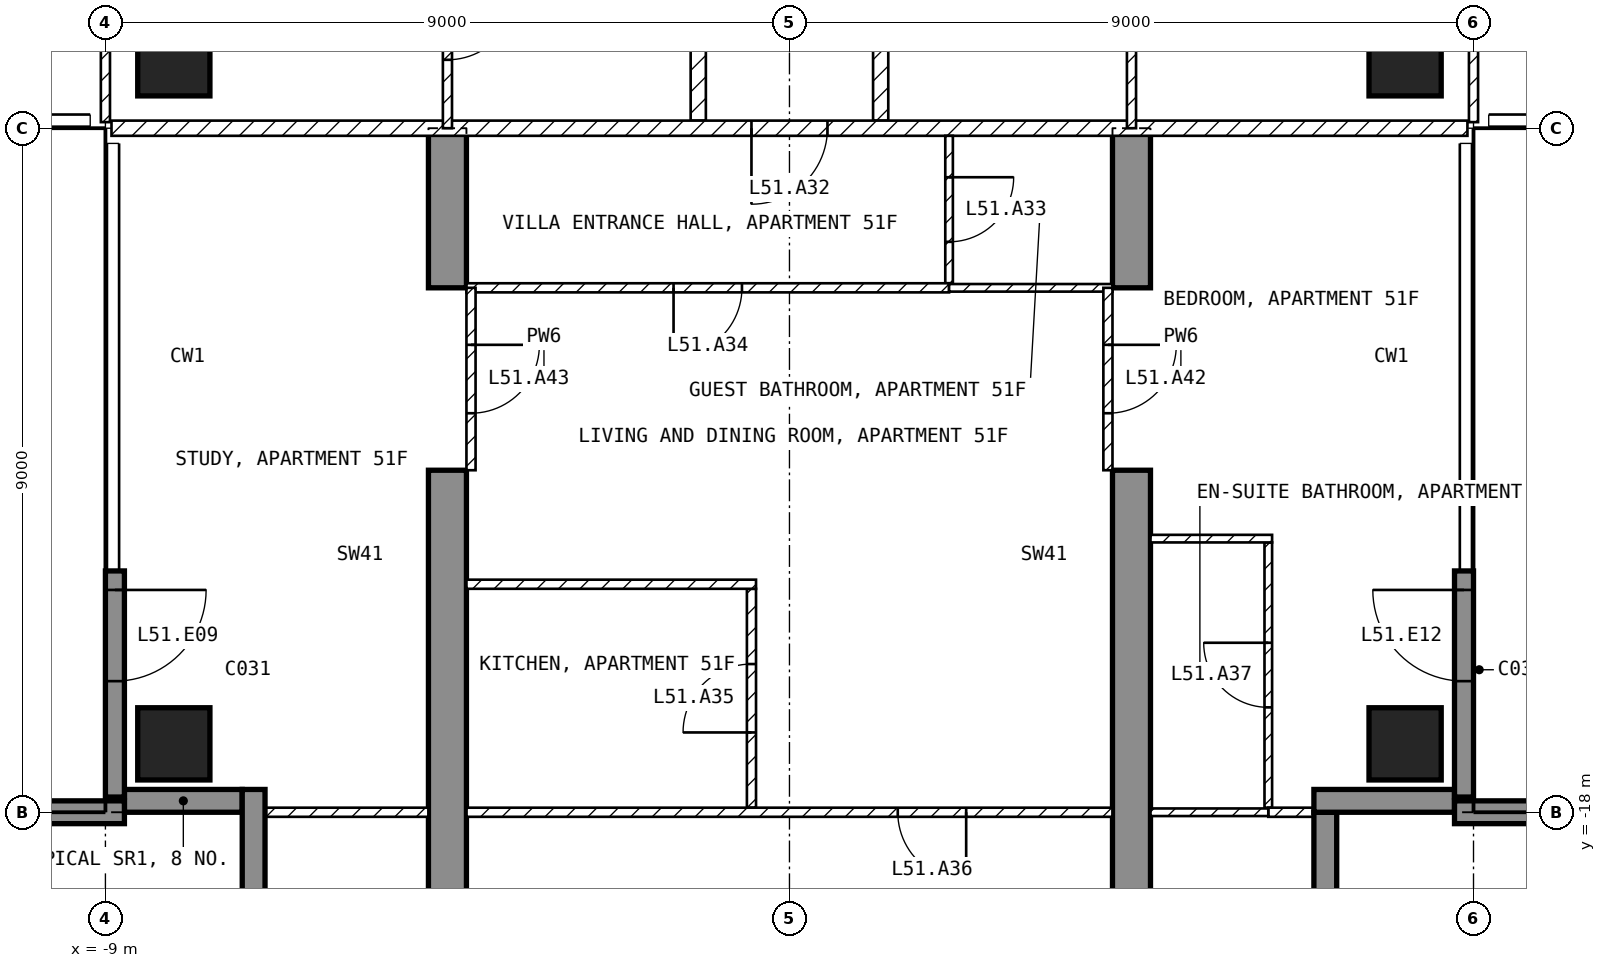
"""IFC4 building model, lengths in metres.
Left out: names, types, materials, properties, quantities, classifications, styles, units other than length and angle.
Written with IfcOpenShell. Run it as: python <this file> out.ifc"""

import sys

from ifc_helpers import new_model, si_unit, direction, frame, frame_2d, origin, origin_2d, place, context, subcontext, project, spatial, polyline, rectangle, outline, extrude, element, fill, save


model = new_model("IFC4")
c1 = context("Model", 3, precision=1e-05, world=origin(), true_north=direction((0.0, 1.0)))
c2 = subcontext(c1, "Body", "Model", "MODEL_VIEW")
j1 = project(units=[si_unit("LENGTHUNIT", "METRE"), si_unit("PLANEANGLEUNIT", "RADIAN")], contexts=[c1])
p1 = place(None, origin())
s1 = spatial("IfcSite", under=j1, at=p1, CompositionType="ELEMENT")
p2 = place(p1, origin())
s2 = spatial("IfcBuilding", under=s1, at=p2, CompositionType="ELEMENT")
p3 = place(p2, frame((0.0, 0.0, 205.1)))
s3 = spatial("IfcBuildingStorey", under=s2, at=p3, CompositionType="ELEMENT", Elevation=205.1)
for number, where, z_axis, x_axis in (
    (1, (-8.1, -17.1, -0.25), (0.0, 0.0, 1.0), (1.0, 0.0, 0.0)),
    (2, (-8.1, -8.1, -0.25), (0.0, 0.0, 1.0), (1.0, 0.0, 0.0)),
    (3, (8.1, -17.1, -0.25), (0.0, 0.0, 1.0), (1.0, 0.0, 0.0)),
    (4, (8.1, -8.1, -0.25), (0.0, 0.0, 1.0), (1.0, 0.0, 0.0)),
):
    element("IfcColumn", number, at=place(p3, frame(where, z_axis=z_axis, x_axis=x_axis)), inside=s3, PredefinedType="COLUMN", context=c2, shape_type="SweptSolid", body=[
        extrude(rectangle(XDim=0.95, YDim=0.95, at=origin_2d()), origin(), (0.0, 0.0, 1.0), 3.5),
    ])
for number, where, z_axis, x_axis in (
    (5, (-4.75, -20.225, -0.25), (1.0, 0.0, 0.0), (0.0, 1.0, 0.0)),
    (6, (4.25, -20.225, -0.25), (1.0, 0.0, 0.0), (0.0, 1.0, 0.0)),
):
    element("IfcWall", number, at=place(p3, frame(where, z_axis=z_axis, x_axis=x_axis)), inside=s3, PredefinedType="SHEAR", context=c2, shape_type="SweptSolid", body=[
        extrude(outline(polyline([(0.0, 0.0), (6.725, 0.0), (6.725, 2.65), (9.125, 2.65), (9.125, 0.0), (11.225, 0.0), (11.225, 3.5), (0.0, 3.5), (0.0, 0.0)])), origin(), (0.0, 0.0, 1.0), 0.5),
    ])
p4 = place(p3, frame((-8.875, -14.825, 0.0), z_axis=(0.0, 0.0, 1.0), x_axis=(0.0, -1.0, 0.0)))
e7 = element("IfcWall", 7, at=p4, inside=s3, PredefinedType="SOLIDWALL", context=c2, shape_type="SweptSolid", body=[
    extrude(rectangle(XDim=2.975, YDim=0.25, at=frame_2d((1.488, 0.0))), origin(), (0.0, 0.0, 1.0), 3.25),
])
p5 = place(p4, frame((0.25, 0.0, 0.0)))
e8 = element("IfcOpeningElement", 8, at=p5, cuts=e7, PredefinedType="OPENING", context=c2, shape_type="SweptSolid", body=[
    extrude(rectangle(XDim=1.2, YDim=2.4, at=frame_2d((0.6, 1.2))), frame((0.0, 0.135, 0.0), z_axis=(0.0, -1.0, 0.0), x_axis=(1.0, 0.0, 0.0)), (0.0, 0.0, 1.0), 0.27),
])
p6 = place(p3, frame((8.875, -17.8, 0.0), z_axis=(0.0, 0.0, 1.0), x_axis=(0.0, 1.0, 0.0)))
e9 = element("IfcWall", 9, at=p6, inside=s3, PredefinedType="SOLIDWALL", context=c2, shape_type="SweptSolid", body=[
    extrude(rectangle(XDim=2.975, YDim=0.25, at=frame_2d((1.488, 0.0))), origin(), (0.0, 0.0, 1.0), 3.25),
])
p7 = place(p6, frame((1.525, 0.0, 0.0)))
e10 = element("IfcOpeningElement", 10, at=p7, cuts=e9, PredefinedType="OPENING", context=c2, shape_type="SweptSolid", body=[
    extrude(rectangle(XDim=1.2, YDim=2.4, at=frame_2d((0.6, 1.2))), frame((0.0, 0.135, 0.0), z_axis=(0.0, -1.0, 0.0), x_axis=(1.0, 0.0, 0.0)), (0.0, 0.0, 1.0), 0.27),
])
p8 = place(p3, frame((7.05, -19.8, 0.0), z_axis=(0.0, 0.0, 1.0), x_axis=(0.0, 1.0, 0.0)))
e11 = element("IfcWall", 11, at=p8, inside=s3, PredefinedType="SOLIDWALL", context=c2, shape_type="SweptSolid", body=[
    extrude(rectangle(XDim=1.8, YDim=0.3, at=frame_2d((0.9, 0.0))), origin(), (0.0, 0.0, 1.0), 3.25),
])
p9 = place(p3, frame((6.9, -17.85, 0.0), z_axis=(0.0, 0.0, 1.0), x_axis=(1.0, 0.0, 0.0)))
e12 = element("IfcWall", 12, at=p9, inside=s3, PredefinedType="SOLIDWALL", context=c2, shape_type="SweptSolid", body=[
    extrude(rectangle(XDim=1.85, YDim=0.3, at=frame_2d((0.925, 0.0))), origin(), (0.0, 0.0, 1.0), 3.25),
])
p10 = place(p3, frame((-8.75, -17.85, 0.0), z_axis=(0.0, 0.0, 1.0), x_axis=(1.0, 0.0, 0.0)))
e13 = element("IfcWall", 13, at=p10, inside=s3, PredefinedType="SOLIDWALL", context=c2, shape_type="SweptSolid", body=[
    extrude(rectangle(XDim=1.55, YDim=0.3, at=frame_2d((0.775, 0.0))), origin(), (0.0, 0.0, 1.0), 3.25),
])
p11 = place(p3, frame((-7.05, -17.7, 0.0), z_axis=(0.0, 0.0, 1.0), x_axis=(0.0, -1.0, 0.0)))
e14 = element("IfcWall", 14, at=p11, inside=s3, PredefinedType="SOLIDWALL", context=c2, shape_type="SweptSolid", body=[
    extrude(rectangle(XDim=1.8, YDim=0.3, at=frame_2d((0.9, 0.0))), origin(), (0.0, 0.0, 1.0), 3.25),
])
for number, where, z_axis, x_axis in (
    (15, (-8.75, -18.0, 0.0), (0.0, 0.0, 1.0), (-1.0, 0.0, 0.0)),
    (16, (8.75, -18.0, 0.0), (0.0, 0.0, 1.0), (1.0, 0.0, 0.0)),
):
    element("IfcWall", number, at=place(p3, frame(where, z_axis=z_axis, x_axis=x_axis)), inside=s3, PredefinedType="SOLIDWALL", context=c2, shape_type="SweptSolid", body=[
        extrude(rectangle(XDim=2.95, YDim=0.3, at=frame_2d((1.475, 0.0))), origin(), (0.0, 0.0, 1.0), 3.25),
    ])
for number, where, z_axis, x_axis in (
    (17, (1.2, -4.6, 0.0), (0.0, 0.0, 1.0), (0.0, -1.0, 0.0)),
    (18, (-1.2, -8.9, 0.0), (0.0, 0.0, 1.0), (0.0, 1.0, 0.0)),
):
    element("IfcWall", number, at=place(p3, frame(where, z_axis=z_axis, x_axis=x_axis)), inside=s3, PredefinedType="PARTITIONING", context=c2, shape_type="SweptSolid", body=[
        extrude(rectangle(XDim=4.3, YDim=0.2, at=frame_2d((2.15, 0.0))), origin(), (0.0, 0.0, 1.0), 3.25),
    ])
p12 = place(p3, frame((8.92, -9.0, 0.0), z_axis=(0.0, 0.0, 1.0), x_axis=(-1.0, 0.0, 0.0)))
e19 = element("IfcWall", 19, at=p12, inside=s3, PredefinedType="PARTITIONING", context=c2, shape_type="SweptSolid", body=[
    extrude(rectangle(XDim=17.84, YDim=0.2, at=frame_2d((8.92, 0.0))), origin(), (0.0, 0.0, 1.0), 3.25),
])
p13 = place(p12, frame((8.42, 0.0, 0.0)))
e20 = element("IfcOpeningElement", 20, at=p13, cuts=e19, PredefinedType="OPENING", context=c2, shape_type="SweptSolid", body=[
    extrude(rectangle(XDim=1.0, YDim=2.1, at=frame_2d((0.5, 1.05))), frame((0.0, 0.11, 0.0), z_axis=(0.0, -1.0, 0.0), x_axis=(1.0, 0.0, 0.0)), (0.0, 0.0, 1.0), 0.22),
])
p14 = place(p3, frame((9.0, -8.92, 0.0), z_axis=(0.0, 0.0, 1.0), x_axis=(0.0, 1.0, 0.0)))
e21 = element("IfcWall", 21, at=p14, inside=s3, PredefinedType="PARTITIONING", context=c2, shape_type="SweptSolid", body=[
    extrude(rectangle(XDim=7.62, YDim=0.12, at=frame_2d((3.81, 0.0))), origin(), (0.0, 0.0, 1.0), 3.25),
])
p15 = place(p14, frame((2.42, 0.0, 0.0)))
e22 = element("IfcOpeningElement", 22, at=p15, cuts=e21, PredefinedType="OPENING", context=c2, shape_type="SweptSolid", body=[
    extrude(rectangle(XDim=0.9, YDim=2.1, at=frame_2d((0.45, 1.05))), frame((0.0, 0.07, 0.0), z_axis=(0.0, -1.0, 0.0), x_axis=(1.0, 0.0, 0.0)), (0.0, 0.0, 1.0), 0.14),
])
p16 = place(p3, frame((4.5, -9.0, 0.0), z_axis=(0.0, 0.0, 1.0), x_axis=(0.0, 1.0, 0.0)))
e23 = element("IfcWall", 23, at=p16, inside=s3, PredefinedType="PARTITIONING", context=c2, shape_type="SweptSolid", body=[
    extrude(rectangle(XDim=4.5, YDim=0.12, at=frame_2d((2.25, 0.0))), origin(), (0.0, 0.0, 1.0), 3.25),
])
p17 = place(p16, frame((1.8, 0.0, 0.0)))
e24 = element("IfcOpeningElement", 24, at=p17, cuts=e23, PredefinedType="OPENING", context=c2, shape_type="SweptSolid", body=[
    extrude(rectangle(XDim=0.9, YDim=2.1, at=frame_2d((0.45, 1.05))), frame((0.0, 0.07, 0.0), z_axis=(0.0, -1.0, 0.0), x_axis=(1.0, 0.0, 0.0)), (0.0, 0.0, 1.0), 0.14),
])
p18 = place(p3, frame((-9.0, -1.3, 0.0), z_axis=(0.0, 0.0, 1.0), x_axis=(0.0, -1.0, 0.0)))
e25 = element("IfcWall", 25, at=p18, inside=s3, PredefinedType="PARTITIONING", context=c2, shape_type="SweptSolid", body=[
    extrude(rectangle(XDim=7.62, YDim=0.12, at=frame_2d((3.81, 0.0))), origin(), (0.0, 0.0, 1.0), 3.25),
])
p19 = place(p18, frame((4.1, 0.0, 0.0)))
e26 = element("IfcOpeningElement", 26, at=p19, cuts=e25, PredefinedType="OPENING", context=c2, shape_type="SweptSolid", body=[
    extrude(rectangle(XDim=0.9, YDim=2.1, at=frame_2d((0.45, 1.05))), frame((0.0, 0.07, 0.0), z_axis=(0.0, -1.0, 0.0), x_axis=(1.0, 0.0, 0.0)), (0.0, 0.0, 1.0), 0.14),
])
p20 = place(p3, frame((-4.5, -6.3, 0.0), z_axis=(0.0, 0.0, 1.0), x_axis=(0.0, -1.0, 0.0)))
e27 = element("IfcWall", 27, at=p20, inside=s3, PredefinedType="PARTITIONING", context=c2, shape_type="SweptSolid", body=[
    extrude(rectangle(XDim=2.7, YDim=0.12, at=frame_2d((1.35, 0.0))), origin(), (0.0, 0.0, 1.0), 3.25),
])
p21 = place(p20, frame((0.9, 0.0, 0.0)))
e28 = element("IfcOpeningElement", 28, at=p21, cuts=e27, PredefinedType="OPENING", context=c2, shape_type="SweptSolid", body=[
    extrude(rectangle(XDim=0.9, YDim=2.1, at=frame_2d((0.45, 1.05))), frame((0.0, 0.07, 0.0), z_axis=(0.0, -1.0, 0.0), x_axis=(1.0, 0.0, 0.0)), (0.0, 0.0, 1.0), 0.14),
])
p22 = place(p3, frame((2.1, -9.1, 0.0), z_axis=(0.0, 0.0, 1.0), x_axis=(0.0, -1.0, 0.0)))
e29 = element("IfcWall", 29, at=p22, inside=s3, PredefinedType="PARTITIONING", context=c2, shape_type="SweptSolid", body=[
    extrude(rectangle(XDim=1.94, YDim=0.1, at=frame_2d((0.97, 0.0))), origin(), (0.0, 0.0, 1.0), 3.25),
])
p23 = place(p22, frame((0.545, 0.0, 0.0)))
e30 = element("IfcOpeningElement", 30, at=p23, cuts=e29, PredefinedType="OPENING", context=c2, shape_type="SweptSolid", body=[
    extrude(rectangle(XDim=0.85, YDim=2.1, at=frame_2d((0.425, 1.05))), frame((0.0, 0.06, 0.0), z_axis=(0.0, -1.0, 0.0), x_axis=(1.0, 0.0, 0.0)), (0.0, 0.0, 1.0), 0.12),
])
p24 = place(p3, frame((2.1, -11.1, 0.0), z_axis=(0.0, 0.0, 1.0), x_axis=(-1.0, 0.0, 0.0)))
e31 = element("IfcWall", 31, at=p24, inside=s3, PredefinedType="PARTITIONING", context=c2, shape_type="SweptSolid", body=[
    extrude(rectangle(XDim=6.35, YDim=0.12, at=frame_2d((3.175, 0.0))), origin(), (0.0, 0.0, 1.0), 3.25),
])
p25 = place(p24, frame((2.725, 0.0, 0.0)))
e32 = element("IfcOpeningElement", 32, at=p25, cuts=e31, PredefinedType="OPENING", context=c2, shape_type="SweptSolid", body=[
    extrude(rectangle(XDim=0.9, YDim=2.1, at=frame_2d((0.45, 1.05))), frame((0.0, 0.07, 0.0), z_axis=(0.0, -1.0, 0.0), x_axis=(1.0, 0.0, 0.0)), (0.0, 0.0, 1.0), 0.14),
])
p26 = place(p3, frame((4.25, -11.1, 0.0), z_axis=(0.0, 0.0, 1.0), x_axis=(-1.0, 0.0, 0.0)))
e33 = element("IfcWall", 33, at=p26, inside=s3, PredefinedType="PARTITIONING", context=c2, shape_type="SweptSolid", body=[
    extrude(rectangle(XDim=2.15, YDim=0.1, at=frame_2d((1.075, 0.0))), origin(), (0.0, 0.0, 1.0), 3.25),
])
p27 = place(p3, frame((-0.5, -17.94, 0.0), z_axis=(0.0, 0.0, 1.0), x_axis=(0.0, 1.0, 0.0)))
e34 = element("IfcWall", 34, at=p27, inside=s3, PredefinedType="PARTITIONING", context=c2, shape_type="SweptSolid", body=[
    extrude(rectangle(XDim=2.88, YDim=0.12, at=frame_2d((1.44, 0.0))), origin(), (0.0, 0.0, 1.0), 3.25),
])
p28 = place(p27, frame((0.99, 0.0, 0.0)))
e35 = element("IfcOpeningElement", 35, at=p28, cuts=e34, PredefinedType="OPENING", context=c2, shape_type="SweptSolid", body=[
    extrude(rectangle(XDim=0.9, YDim=2.1, at=frame_2d((0.45, 1.05))), frame((0.0, 0.07, 0.0), z_axis=(0.0, -1.0, 0.0), x_axis=(1.0, 0.0, 0.0)), (0.0, 0.0, 1.0), 0.14),
])
p29 = place(p3, frame((-0.44, -15.0, 0.0), z_axis=(0.0, 0.0, 1.0), x_axis=(-1.0, 0.0, 0.0)))
e36 = element("IfcWall", 36, at=p29, inside=s3, PredefinedType="PARTITIONING", context=c2, shape_type="SweptSolid", body=[
    extrude(rectangle(XDim=3.81, YDim=0.12, at=frame_2d((1.905, 0.0))), origin(), (0.0, 0.0, 1.0), 3.25),
])
p30 = place(p3, frame((4.25, -18.0, 0.0), z_axis=(0.0, 0.0, 1.0), x_axis=(-1.0, 0.0, 0.0)))
e37 = element("IfcWall", 37, at=p30, inside=s3, PredefinedType="PARTITIONING", context=c2, shape_type="SweptSolid", body=[
    extrude(rectangle(XDim=8.5, YDim=0.12, at=frame_2d((4.25, 0.0))), origin(), (0.0, 0.0, 1.0), 3.25),
])
p31 = place(p30, frame((1.925, 0.0, 0.0)))
e38 = element("IfcOpeningElement", 38, at=p31, cuts=e37, PredefinedType="OPENING", context=c2, shape_type="SweptSolid", body=[
    extrude(rectangle(XDim=0.9, YDim=2.1, at=frame_2d((0.45, 1.05))), frame((0.0, 0.07, 0.0), z_axis=(0.0, -1.0, 0.0), x_axis=(1.0, 0.0, 0.0)), (0.0, 0.0, 1.0), 0.14),
])
p32 = place(p3, frame((6.3, -17.94, 0.0), z_axis=(0.0, 0.0, 1.0), x_axis=(0.0, 1.0, 0.0)))
e39 = element("IfcWall", 39, at=p32, inside=s3, PredefinedType="PARTITIONING", context=c2, shape_type="SweptSolid", body=[
    extrude(rectangle(XDim=3.49, YDim=0.1, at=frame_2d((1.745, 0.0))), origin(), (0.0, 0.0, 1.0), 3.25),
])
p33 = place(p32, frame((1.32, 0.0, 0.0)))
e40 = element("IfcOpeningElement", 40, at=p33, cuts=e39, PredefinedType="OPENING", context=c2, shape_type="SweptSolid", body=[
    extrude(rectangle(XDim=0.85, YDim=2.1, at=frame_2d((0.425, 1.05))), frame((0.0, 0.06, 0.0), z_axis=(0.0, -1.0, 0.0), x_axis=(1.0, 0.0, 0.0)), (0.0, 0.0, 1.0), 0.12),
])
p34 = place(p3, frame((6.35, -14.4, 0.0), z_axis=(0.0, 0.0, 1.0), x_axis=(-1.0, 0.0, 0.0)))
e41 = element("IfcWall", 41, at=p34, inside=s3, PredefinedType="PARTITIONING", context=c2, shape_type="SweptSolid", body=[
    extrude(rectangle(XDim=1.6, YDim=0.1, at=frame_2d((0.8, 0.0))), origin(), (0.0, 0.0, 1.0), 3.25),
])
p35 = place(p3, frame((7.12, -18.0, 0.0), z_axis=(0.0, 0.0, 1.0), x_axis=(-1.0, 0.0, 0.0)))
e42 = element("IfcWall", 42, at=p35, inside=s3, PredefinedType="PARTITIONING", context=c2, shape_type="SweptSolid", body=[
    extrude(rectangle(XDim=0.82, YDim=0.12, at=frame_2d((0.41, 0.0))), origin(), (0.0, 0.0, 1.0), 3.25),
])
p36 = place(p3, frame((6.3, -18.0, 0.0), z_axis=(0.0, 0.0, 1.0), x_axis=(-1.0, 0.0, 0.0)))
e43 = element("IfcWall", 43, at=p36, inside=s3, PredefinedType="PARTITIONING", context=c2, shape_type="SweptSolid", body=[
    extrude(rectangle(XDim=1.55, YDim=0.1, at=frame_2d((0.775, 0.0))), origin(), (0.0, 0.0, 1.0), 3.25),
])
p37 = place(p3, frame((-4.75, -18.0, 0.0), z_axis=(0.0, 0.0, 1.0), x_axis=(-1.0, 0.0, 0.0)))
e44 = element("IfcWall", 44, at=p37, inside=s3, PredefinedType="PARTITIONING", context=c2, shape_type="SweptSolid", body=[
    extrude(rectangle(XDim=2.37, YDim=0.12, at=frame_2d((1.185, 0.0))), origin(), (0.0, 0.0, 1.0), 3.25),
])
p38 = place(p3, frame((4.19, -11.1, 0.0), z_axis=(0.0, 0.0, 1.0), x_axis=(0.0, -1.0, 0.0)))
e45 = element("IfcWall", 45, at=p38, inside=s3, PredefinedType="PARTITIONING", context=c2, shape_type="SweptSolid", body=[
    extrude(rectangle(XDim=2.4, YDim=0.12, at=frame_2d((1.2, 0.0))), origin(), (0.0, 0.0, 1.0), 2.4),
])
p39 = place(p38, frame((0.75, 0.0, 0.0)))
e46 = element("IfcOpeningElement", 46, at=p39, cuts=e45, PredefinedType="OPENING", context=c2, shape_type="SweptSolid", body=[
    extrude(rectangle(XDim=0.9, YDim=2.1, at=frame_2d((0.45, 1.05))), frame((0.0, 0.07, 0.0), z_axis=(0.0, -1.0, 0.0), x_axis=(1.0, 0.0, 0.0)), (0.0, 0.0, 1.0), 0.14),
])
p40 = place(p3, frame((-4.19, -11.1, 0.0), z_axis=(0.0, 0.0, 1.0), x_axis=(0.0, -1.0, 0.0)))
e47 = element("IfcWall", 47, at=p40, inside=s3, PredefinedType="PARTITIONING", context=c2, shape_type="SweptSolid", body=[
    extrude(rectangle(XDim=2.4, YDim=0.12, at=frame_2d((1.2, 0.0))), origin(), (0.0, 0.0, 1.0), 2.4),
])
p41 = place(p40, frame((0.75, 0.0, 0.0)))
e48 = element("IfcOpeningElement", 48, at=p41, cuts=e47, PredefinedType="OPENING", context=c2, shape_type="SweptSolid", body=[
    extrude(rectangle(XDim=0.9, YDim=2.1, at=frame_2d((0.45, 1.05))), frame((0.0, 0.07, 0.0), z_axis=(0.0, -1.0, 0.0), x_axis=(1.0, 0.0, 0.0)), (0.0, 0.0, 1.0), 0.14),
])
p42 = place(p5, origin())
e49 = element("IfcDoor", 49, at=p42, inside=s3, OperationType="SINGLE_SWING_LEFT", PredefinedType="DOOR", context=c2, shape_type="SweptSolid", body=[
    extrude(rectangle(XDim=1.2, YDim=2.4, at=frame_2d((0.6, 1.2))), frame((0.0, 0.025, 0.0), z_axis=(0.0, -1.0, 0.0), x_axis=(1.0, 0.0, 0.0)), (0.0, 0.0, 1.0), 0.05),
])
fill(e8, e49)
p43 = place(p7, origin())
e50 = element("IfcDoor", 50, at=p43, inside=s3, OperationType="SINGLE_SWING_RIGHT", PredefinedType="DOOR", context=c2, shape_type="SweptSolid", body=[
    extrude(rectangle(XDim=1.2, YDim=2.4, at=frame_2d((0.6, 1.2))), frame((0.0, 0.025, 0.0), z_axis=(0.0, -1.0, 0.0), x_axis=(1.0, 0.0, 0.0)), (0.0, 0.0, 1.0), 0.05),
])
fill(e10, e50)
p44 = place(p21, origin())
e51 = element("IfcDoor", 51, at=p44, inside=s3, OperationType="SINGLE_SWING_LEFT", PredefinedType="DOOR", context=c2, shape_type="SweptSolid", body=[
    extrude(rectangle(XDim=0.9, YDim=2.1, at=frame_2d((0.45, 1.05))), frame((0.0, 0.025, 0.0), z_axis=(0.0, -1.0, 0.0), x_axis=(1.0, 0.0, 0.0)), (0.0, 0.0, 1.0), 0.05),
])
fill(e28, e51)
p45 = place(p13, origin())
e52 = element("IfcDoor", 52, at=p45, inside=s3, OperationType="SINGLE_SWING_RIGHT", PredefinedType="DOOR", context=c2, shape_type="SweptSolid", body=[
    extrude(rectangle(XDim=1.0, YDim=2.1, at=frame_2d((0.5, 1.05))), frame((0.0, 0.025, 0.0), z_axis=(0.0, -1.0, 0.0), x_axis=(1.0, 0.0, 0.0)), (0.0, 0.0, 1.0), 0.05),
])
fill(e20, e52)
p46 = place(p23, origin())
e53 = element("IfcDoor", 53, at=p46, inside=s3, OperationType="SINGLE_SWING_LEFT", PredefinedType="DOOR", context=c2, shape_type="SweptSolid", body=[
    extrude(rectangle(XDim=0.85, YDim=2.1, at=frame_2d((0.425, 1.05))), frame((0.0, 0.025, 0.0), z_axis=(0.0, -1.0, 0.0), x_axis=(1.0, 0.0, 0.0)), (0.0, 0.0, 1.0), 0.05),
])
fill(e30, e53)
p47 = place(p25, origin())
e54 = element("IfcDoor", 54, at=p47, inside=s3, OperationType="SINGLE_SWING_RIGHT", PredefinedType="DOOR", context=c2, shape_type="SweptSolid", body=[
    extrude(rectangle(XDim=0.9, YDim=2.1, at=frame_2d((0.45, 1.05))), frame((0.0, 0.025, 0.0), z_axis=(0.0, -1.0, 0.0), x_axis=(1.0, 0.0, 0.0)), (0.0, 0.0, 1.0), 0.05),
])
fill(e32, e54)
p48 = place(p28, origin())
e55 = element("IfcDoor", 55, at=p48, inside=s3, OperationType="SINGLE_SWING_LEFT", PredefinedType="DOOR", context=c2, shape_type="SweptSolid", body=[
    extrude(rectangle(XDim=0.9, YDim=2.1, at=frame_2d((0.45, 1.05))), frame((0.0, 0.025, 0.0), z_axis=(0.0, -1.0, 0.0), x_axis=(1.0, 0.0, 0.0)), (0.0, 0.0, 1.0), 0.05),
])
fill(e35, e55)
p49 = place(p31, origin())
e56 = element("IfcDoor", 56, at=p49, inside=s3, OperationType="SINGLE_SWING_LEFT", PredefinedType="DOOR", context=c2, shape_type="SweptSolid", body=[
    extrude(rectangle(XDim=0.9, YDim=2.1, at=frame_2d((0.45, 1.05))), frame((0.0, 0.025, 0.0), z_axis=(0.0, -1.0, 0.0), x_axis=(1.0, 0.0, 0.0)), (0.0, 0.0, 1.0), 0.05),
])
fill(e38, e56)
p50 = place(p33, origin())
e57 = element("IfcDoor", 57, at=p50, inside=s3, OperationType="SINGLE_SWING_RIGHT", PredefinedType="DOOR", context=c2, shape_type="SweptSolid", body=[
    extrude(rectangle(XDim=0.85, YDim=2.1, at=frame_2d((0.425, 1.05))), frame((0.0, 0.025, 0.0), z_axis=(0.0, -1.0, 0.0), x_axis=(1.0, 0.0, 0.0)), (0.0, 0.0, 1.0), 0.05),
])
fill(e40, e57)
p51 = place(p39, origin())
e58 = element("IfcDoor", 58, at=p51, inside=s3, OperationType="SINGLE_SWING_LEFT", PredefinedType="DOOR", context=c2, shape_type="SweptSolid", body=[
    extrude(rectangle(XDim=0.9, YDim=2.1, at=frame_2d((0.45, 1.05))), frame((0.0, 0.025, 0.0), z_axis=(0.0, -1.0, 0.0), x_axis=(1.0, 0.0, 0.0)), (0.0, 0.0, 1.0), 0.05),
])
fill(e46, e58)
p52 = place(p41, origin())
e59 = element("IfcDoor", 59, at=p52, inside=s3, OperationType="SINGLE_SWING_LEFT", PredefinedType="DOOR", context=c2, shape_type="SweptSolid", body=[
    extrude(rectangle(XDim=0.9, YDim=2.1, at=frame_2d((0.45, 1.05))), frame((0.0, 0.025, 0.0), z_axis=(0.0, -1.0, 0.0), x_axis=(1.0, 0.0, 0.0)), (0.0, 0.0, 1.0), 0.05),
])
fill(e48, e59)
save(model, sys.argv[1])
